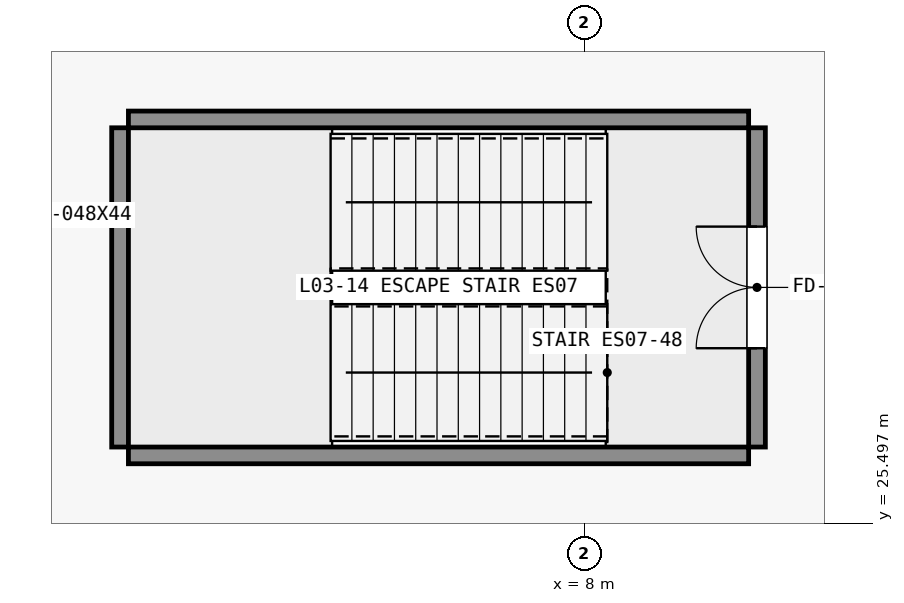
"""IFC4 building model, lengths in metres.
Left out: names, types, materials, properties, quantities, classifications, styles, units other than length and angle.
Written with IfcOpenShell. Run it as: python <this file> out.ifc"""

import sys

from ifc_helpers import new_model, si_unit, direction, frame, frame_2d, origin, place, context, subcontext, project, spatial, rectangle, extrude, element, fill, save


model = new_model("IFC4")
c1 = context("Model", 3, precision=1e-05, world=origin(), true_north=direction((0.0, 1.0)))
c2 = subcontext(c1, "Body", "Model", "MODEL_VIEW")
j1 = project(units=[si_unit("LENGTHUNIT", "METRE"), si_unit("PLANEANGLEUNIT", "RADIAN")], contexts=[c1])
p1 = place(None, origin())
s1 = spatial("IfcSite", under=j1, at=p1, CompositionType="ELEMENT")
p2 = place(p1, origin())
s2 = spatial("IfcBuilding", under=s1, at=p2, CompositionType="ELEMENT")
p3 = place(p2, frame((0.0, 0.0, 16.2)))
s3 = spatial("IfcBuildingStorey", under=s2, at=p3, CompositionType="ELEMENT", Elevation=16.2)
for number, where, z_axis, x_axis in (
    (1, (2.0, 26.39, 0.0), (0.0, 0.0, 1.0), (1.0, 0.0, 0.0)),
    (2, (2.0, 30.81, 0.0), (0.0, 0.0, 1.0), (1.0, 0.0, 0.0)),
):
    element("IfcWall", number, at=place(p3, frame(where, z_axis=z_axis, x_axis=x_axis)), inside=s3, PredefinedType="SHEAR", context=c2, shape_type="SweptSolid", body=[
        extrude(rectangle(XDim=8.16, YDim=0.22, at=frame_2d((4.08, 0.0))), origin(), (0.0, 0.0, 1.0), 4.8),
    ])
p4 = place(p3, frame((1.89, 26.5, 0.0), z_axis=(0.0, 0.0, 1.0), x_axis=(0.0, 1.0, 0.0)))
e3 = element("IfcWall", 3, at=p4, inside=s3, PredefinedType="SHEAR", context=c2, shape_type="SweptSolid", body=[
    extrude(rectangle(XDim=4.2, YDim=0.22, at=frame_2d((2.1, 0.0))), origin(), (0.0, 0.0, 1.0), 4.8),
])
p5 = place(p3, frame((10.27, 26.5, 0.0), z_axis=(0.0, 0.0, 1.0), x_axis=(0.0, 1.0, 0.0)))
e4 = element("IfcWall", 4, at=p5, inside=s3, PredefinedType="SHEAR", context=c2, shape_type="SweptSolid", body=[
    extrude(rectangle(XDim=4.2, YDim=0.22, at=frame_2d((2.1, 0.0))), origin(), (0.0, 0.0, 1.0), 4.8),
])
p6 = place(p5, frame((1.3, 0.0, 0.0)))
e5 = element("IfcOpeningElement", 5, at=p6, cuts=e4, PredefinedType="OPENING", context=c2, shape_type="SweptSolid", body=[
    extrude(rectangle(XDim=1.6, YDim=2.2, at=frame_2d((0.8, 1.1))), frame((0.0, 0.12, 0.0), z_axis=(0.0, -1.0, 0.0), x_axis=(1.0, 0.0, 0.0)), (0.0, 0.0, 1.0), 0.24),
])
p7 = place(p6, origin())
e6 = element("IfcDoor", 6, at=p7, inside=s3, OperationType="DOUBLE_DOOR_SINGLE_SWING", PredefinedType="DOOR", context=c2, shape_type="SweptSolid", body=[
    extrude(rectangle(XDim=1.6, YDim=2.2, at=frame_2d((0.8, 1.1))), frame((0.0, 0.025, 0.0), z_axis=(0.0, -1.0, 0.0), x_axis=(1.0, 0.0, 0.0)), (0.0, 0.0, 1.0), 0.05),
])
fill(e5, e6)
save(model, sys.argv[1])
